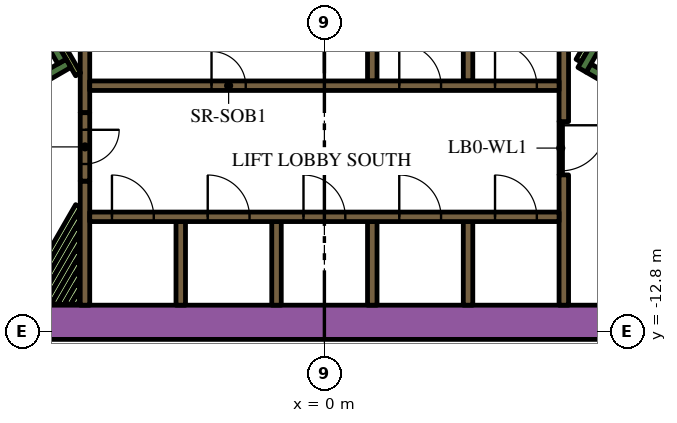
"""IFC4 building model, lengths in metres.
Left out: names, types, materials, properties, quantities, classifications, styles, units other than length and angle.
Written with IfcOpenShell. Run it as: python <this file> out.ifc"""

import sys

from ifc_helpers import new_model, si_unit, direction, frame, frame_2d, origin, place, context, subcontext, project, spatial, rectangle, extrude, element, fill, save


model = new_model("IFC4")
c1 = context("Model", 3, precision=1e-05, world=origin(), true_north=direction((0.0, 1.0)))
c2 = subcontext(c1, "Body", "Model", "MODEL_VIEW")
j1 = project(units=[si_unit("LENGTHUNIT", "METRE"), si_unit("PLANEANGLEUNIT", "RADIAN")], contexts=[c1])
p1 = place(None, origin())
s1 = spatial("IfcSite", under=j1, at=p1, CompositionType="ELEMENT")
p2 = place(p1, origin())
s2 = spatial("IfcBuilding", under=s1, at=p2, CompositionType="ELEMENT")
p3 = place(p2, frame((0.0, 0.0, 74.4)))
s3 = spatial("IfcBuildingStorey", under=s2, at=p3, CompositionType="ELEMENT", Elevation=74.4)
p4 = place(p3, frame((-12.019, -12.55, 0.0), z_axis=(0.0, 0.0, 1.0), x_axis=(1.0, 0.0, 0.0)))
e1 = element("IfcWall", 1, at=p4, inside=s3, PredefinedType="SOLIDWALL", context=c2, shape_type="SweptSolid", body=[
    extrude(rectangle(XDim=21.63, YDim=0.9, at=frame_2d((10.815, 0.0))), origin(), (0.0, 0.0, 1.0), 3.9),
])
p5 = place(p3, frame((12.84, -9.261, 0.0), z_axis=(0.0, 0.0, 1.0), x_axis=(-0.866013990052, 0.500019768644, 0.0)))
e2 = element("IfcWall", 2, at=p5, inside=s3, PredefinedType="SOLIDWALL", context=c2, shape_type="SweptSolid", body=[
    extrude(rectangle(XDim=6.8, YDim=0.25, at=frame_2d((3.4, 0.0))), origin(), (0.0, 0.0, 1.0), 3.9),
])
p6 = place(p3, frame((6.78, -5.906, 0.0), z_axis=(0.0, 0.0, 1.0), x_axis=(0.500223362819, 0.865896406789, 0.0)))
e3 = element("IfcWall", 3, at=p6, inside=s3, PredefinedType="SOLIDWALL", context=c2, shape_type="SweptSolid", body=[
    extrude(rectangle(XDim=0.675, YDim=0.25, at=frame_2d((0.337, 0.0))), origin(), (0.0, 0.0, 1.0), 3.9),
])
p7 = place(p3, frame((-12.84, -9.261, 0.0), z_axis=(0.0, 0.0, 1.0), x_axis=(0.866016039709, 0.500016218704, 0.0)))
e4 = element("IfcWall", 4, at=p7, inside=s3, PredefinedType="SOLIDWALL", context=c2, shape_type="SweptSolid", body=[
    extrude(rectangle(XDim=7.05, YDim=0.25, at=frame_2d((3.525, 0.0))), origin(), (0.0, 0.0, 1.0), 3.9),
])
p8 = place(p3, frame((-6.905, -5.69, 0.0), z_axis=(0.0, 0.0, 1.0), x_axis=(-0.500402024738, 0.865793170242, 0.0)))
e5 = element("IfcWall", 5, at=p8, inside=s3, PredefinedType="SOLIDWALL", context=c2, shape_type="SweptSolid", body=[
    extrude(rectangle(XDim=0.425, YDim=0.25, at=frame_2d((0.212, 0.0))), origin(), (0.0, 0.0, 1.0), 3.9),
])
p9 = place(p3, frame((-3.78, -12.1, 0.0), z_axis=(0.0, 0.0, 1.0), x_axis=(0.0, 1.0, 0.0)))
e6 = element("IfcWall", 6, at=p9, inside=s3, PredefinedType="SOLIDWALL", context=c2, shape_type="SweptSolid", body=[
    extrude(rectangle(XDim=2.2, YDim=0.25, at=frame_2d((1.1, 0.0))), origin(), (0.0, 0.0, 1.0), 3.9),
])
p10 = place(p3, frame((-6.3, -12.1, 0.0), z_axis=(0.0, 0.0, 1.0), x_axis=(0.0, 1.0, 0.0)))
e7 = element("IfcWall", 7, at=p10, inside=s3, PredefinedType="SOLIDWALL", context=c2, shape_type="SweptSolid", body=[
    extrude(rectangle(XDim=3.265, YDim=0.25, at=frame_2d((1.632, 0.0))), origin(), (0.0, 0.0, 1.0), 3.9),
])
for number, where, z_axis, x_axis in (
    (8, (3.78, -4.0, 0.0), (0.0, 0.0, 1.0), (0.0, -1.0, 0.0)),
    (9, (1.26, -4.0, 0.0), (0.0, 0.0, 1.0), (0.0, -1.0, 0.0)),
):
    element("IfcWall", number, at=place(p3, frame(where, z_axis=z_axis, x_axis=x_axis)), inside=s3, PredefinedType="SOLIDWALL", context=c2, shape_type="SweptSolid", body=[
        extrude(rectangle(XDim=2.2, YDim=0.25, at=frame_2d((1.1, 0.0))), origin(), (0.0, 0.0, 1.0), 3.9),
    ])
p11 = place(p3, frame((-6.3, -7.035, 0.0), z_axis=(0.0, 0.0, 1.0), x_axis=(0.0, 1.0, 0.0)))
e10 = element("IfcWall", 10, at=p11, inside=s3, PredefinedType="SOLIDWALL", context=c2, shape_type="SweptSolid", body=[
    extrude(rectangle(XDim=3.285, YDim=0.25, at=frame_2d((1.643, 0.0))), origin(), (0.0, 0.0, 1.0), 3.9),
])
p12 = place(p3, frame((6.3, -7.27, 0.0), z_axis=(0.0, 0.0, 1.0), x_axis=(0.0, 1.0, 0.0)))
e11 = element("IfcWall", 11, at=p12, inside=s3, PredefinedType="SOLIDWALL", context=c2, shape_type="SweptSolid", body=[
    extrude(rectangle(XDim=3.586, YDim=0.25, at=frame_2d((1.793, 0.0))), origin(), (0.0, 0.0, 1.0), 3.9),
])
p13 = place(p3, frame((6.3, -12.1, 0.0), z_axis=(0.0, 0.0, 1.0), x_axis=(0.0, 1.0, 0.0)))
e12 = element("IfcWall", 12, at=p13, inside=s3, PredefinedType="SOLIDWALL", context=c2, shape_type="SweptSolid", body=[
    extrude(rectangle(XDim=3.428, YDim=0.25, at=frame_2d((1.714, 0.0))), origin(), (0.0, 0.0, 1.0), 3.9),
])
for number, where, z_axis, x_axis in (
    (13, (3.78, -12.1, 0.0), (0.0, 0.0, 1.0), (0.0, 1.0, 0.0)),
    (14, (1.26, -12.1, 0.0), (0.0, 0.0, 1.0), (0.0, 1.0, 0.0)),
    (15, (-1.26, -12.1, 0.0), (0.0, 0.0, 1.0), (0.0, 1.0, 0.0)),
):
    element("IfcWall", number, at=place(p3, frame(where, z_axis=z_axis, x_axis=x_axis)), inside=s3, PredefinedType="SOLIDWALL", context=c2, shape_type="SweptSolid", body=[
        extrude(rectangle(XDim=2.2, YDim=0.25, at=frame_2d((1.1, 0.0))), origin(), (0.0, 0.0, 1.0), 3.9),
    ])
p14 = place(p3, frame((-7.968, -12.068, 0.0), z_axis=(0.0, 0.0, 1.0), x_axis=(0.500013701029, 0.866017493347, 0.0)))
e16 = element("IfcWall", 16, at=p14, inside=s3, PredefinedType="PARTITIONING", context=c2, shape_type="SweptSolid", body=[
    extrude(rectangle(XDim=2.975, YDim=0.15, at=frame_2d((1.488, 0.0))), origin(), (0.0, 0.0, 1.0), 2.7),
])
p15 = place(p3, frame((-7.794, -12.068, 0.0), z_axis=(0.0, 0.0, 1.0), x_axis=(0.499985098601, 0.86603400694, 0.0)))
e17 = element("IfcWall", 17, at=p15, inside=s3, PredefinedType="PARTITIONING", context=c2, shape_type="SweptSolid", body=[
    extrude(rectangle(XDim=2.628, YDim=0.15, at=frame_2d((1.314, 0.0))), origin(), (0.0, 0.0, 1.0), 2.7),
])
p16 = place(p3, frame((-7.621, -12.068, 0.0), z_axis=(0.0, 0.0, 1.0), x_axis=(0.500028047758, 0.866009209798, 0.0)))
e18 = element("IfcWall", 18, at=p16, inside=s3, PredefinedType="PARTITIONING", context=c2, shape_type="SweptSolid", body=[
    extrude(rectangle(XDim=2.282, YDim=0.15, at=frame_2d((1.141, 0.0))), origin(), (0.0, 0.0, 1.0), 2.7),
])
p17 = place(p3, frame((-7.448, -12.068, 0.0), z_axis=(0.0, 0.0, 1.0), x_axis=(0.500031751504, 0.866007071269, 0.0)))
e19 = element("IfcWall", 19, at=p17, inside=s3, PredefinedType="PARTITIONING", context=c2, shape_type="SweptSolid", body=[
    extrude(rectangle(XDim=1.936, YDim=0.15, at=frame_2d((0.968, 0.0))), origin(), (0.0, 0.0, 1.0), 2.7),
])
p18 = place(p3, frame((-7.275, -12.068, 0.0), z_axis=(0.0, 0.0, 1.0), x_axis=(0.499988385283, 0.86603210944, 0.0)))
e20 = element("IfcWall", 20, at=p18, inside=s3, PredefinedType="PARTITIONING", context=c2, shape_type="SweptSolid", body=[
    extrude(rectangle(XDim=1.589, YDim=0.15, at=frame_2d((0.795, 0.0))), origin(), (0.0, 0.0, 1.0), 2.7),
])
p19 = place(p3, frame((-7.102, -12.068, 0.0), z_axis=(0.0, 0.0, 1.0), x_axis=(0.500068153333, 0.865986051864, 0.0)))
e21 = element("IfcWall", 21, at=p19, inside=s3, PredefinedType="PARTITIONING", context=c2, shape_type="SweptSolid", body=[
    extrude(rectangle(XDim=1.243, YDim=0.15, at=frame_2d((0.622, 0.0))), origin(), (0.0, 0.0, 1.0), 2.7),
])
p20 = place(p3, frame((-6.928, -12.068, 0.0), z_axis=(0.0, 0.0, 1.0), x_axis=(0.500005339912, 0.866022320763, 0.0)))
e22 = element("IfcWall", 22, at=p20, inside=s3, PredefinedType="PARTITIONING", context=c2, shape_type="SweptSolid", body=[
    extrude(rectangle(XDim=0.896, YDim=0.15, at=frame_2d((0.448, 0.0))), origin(), (0.0, 0.0, 1.0), 2.7),
])
p21 = place(p3, frame((-6.755, -12.068, 0.0), z_axis=(0.0, 0.0, 1.0), x_axis=(0.500196256984, 0.865912065108, 0.0)))
e23 = element("IfcWall", 23, at=p21, inside=s3, PredefinedType="PARTITIONING", context=c2, shape_type="SweptSolid", body=[
    extrude(rectangle(XDim=0.55, YDim=0.15, at=frame_2d((0.275, 0.0))), origin(), (0.0, 0.0, 1.0), 2.7),
])
p22 = place(p3, frame((-6.582, -12.068, 0.0), z_axis=(0.0, 0.0, 1.0), x_axis=(0.499618727529, 0.866245419672, 0.0)))
e24 = element("IfcWall", 24, at=p22, inside=s3, PredefinedType="PARTITIONING", context=c2, shape_type="SweptSolid", body=[
    extrude(rectangle(XDim=0.204, YDim=0.15, at=frame_2d((0.102, 0.0))), origin(), (0.0, 0.0, 1.0), 2.7),
])
p23 = place(p3, frame((-6.48, -6.027, 0.0), z_axis=(0.0, 0.0, 1.0), x_axis=(-0.499927229454, 0.866067413802, 0.0)))
e25 = element("IfcWall", 25, at=p23, inside=s3, PredefinedType="PARTITIONING", context=c2, shape_type="SweptSolid", body=[
    extrude(rectangle(XDim=0.929, YDim=0.15, at=frame_2d((0.464, 0.0))), origin(), (0.0, 0.0, 1.0), 3.9),
])
p24 = place(p3, frame((6.945, -5.222, 0.0), z_axis=(0.0, 0.0, 1.0), x_axis=(-0.499818422106, -0.866130212453, 0.0)))
e26 = element("IfcWall", 26, at=p24, inside=s3, PredefinedType="PARTITIONING", context=c2, shape_type="SweptSolid", body=[
    extrude(rectangle(XDim=0.514, YDim=0.15, at=frame_2d((0.257, 0.0))), origin(), (0.0, 0.0, 1.0), 2.7),
])
p25 = place(p3, frame((-6.175, -9.775, 0.0), z_axis=(0.0, 0.0, 1.0), x_axis=(1.0, 0.0, 0.0)))
e27 = element("IfcWall", 27, at=p25, inside=s3, PredefinedType="SOLIDWALL", context=c2, shape_type="SweptSolid", body=[
    extrude(rectangle(XDim=12.35, YDim=0.25, at=frame_2d((6.175, 0.0))), origin(), (0.0, 0.0, 1.0), 3.9),
])
p26 = place(p25, frame((0.585, 0.0, 0.0)))
e28 = element("IfcOpeningElement", 28, at=p26, cuts=e27, PredefinedType="OPENING", context=c2, shape_type="SweptSolid", body=[
    extrude(rectangle(XDim=1.1, YDim=2.1, at=frame_2d((0.55, 1.05))), frame((0.0, 0.135, 0.0), z_axis=(0.0, -1.0, 0.0), x_axis=(1.0, 0.0, 0.0)), (0.0, 0.0, 1.0), 0.27),
])
p27 = place(p25, frame((3.105, 0.0, 0.0)))
e29 = element("IfcOpeningElement", 29, at=p27, cuts=e27, PredefinedType="OPENING", context=c2, shape_type="SweptSolid", body=[
    extrude(rectangle(XDim=1.1, YDim=2.1, at=frame_2d((0.55, 1.05))), frame((0.0, 0.135, 0.0), z_axis=(0.0, -1.0, 0.0), x_axis=(1.0, 0.0, 0.0)), (0.0, 0.0, 1.0), 0.27),
])
p28 = place(p25, frame((5.625, 0.0, 0.0)))
e30 = element("IfcOpeningElement", 30, at=p28, cuts=e27, PredefinedType="OPENING", context=c2, shape_type="SweptSolid", body=[
    extrude(rectangle(XDim=1.1, YDim=2.1, at=frame_2d((0.55, 1.05))), frame((0.0, 0.135, 0.0), z_axis=(0.0, -1.0, 0.0), x_axis=(1.0, 0.0, 0.0)), (0.0, 0.0, 1.0), 0.27),
])
p29 = place(p25, frame((8.145, 0.0, 0.0)))
e31 = element("IfcOpeningElement", 31, at=p29, cuts=e27, PredefinedType="OPENING", context=c2, shape_type="SweptSolid", body=[
    extrude(rectangle(XDim=1.1, YDim=2.1, at=frame_2d((0.55, 1.05))), frame((0.0, 0.135, 0.0), z_axis=(0.0, -1.0, 0.0), x_axis=(1.0, 0.0, 0.0)), (0.0, 0.0, 1.0), 0.27),
])
p30 = place(p25, frame((10.665, 0.0, 0.0)))
e32 = element("IfcOpeningElement", 32, at=p30, cuts=e27, PredefinedType="OPENING", context=c2, shape_type="SweptSolid", body=[
    extrude(rectangle(XDim=1.1, YDim=2.1, at=frame_2d((0.55, 1.05))), frame((0.0, 0.135, 0.0), z_axis=(0.0, -1.0, 0.0), x_axis=(1.0, 0.0, 0.0)), (0.0, 0.0, 1.0), 0.27),
])
p31 = place(p3, frame((-6.175, -6.325, 0.0), z_axis=(0.0, 0.0, 1.0), x_axis=(1.0, 0.0, 0.0)))
e33 = element("IfcWall", 33, at=p31, inside=s3, PredefinedType="SOLIDWALL", context=c2, shape_type="SweptSolid", body=[
    extrude(rectangle(XDim=12.35, YDim=0.25, at=frame_2d((6.175, 0.0))), origin(), (0.0, 0.0, 1.0), 3.9),
])
p32 = place(p31, frame((3.205, 0.0, 0.0)))
e34 = element("IfcOpeningElement", 34, at=p32, cuts=e33, PredefinedType="OPENING", context=c2, shape_type="SweptSolid", body=[
    extrude(rectangle(XDim=0.9, YDim=2.1, at=frame_2d((0.45, 1.05))), frame((0.0, 0.135, 0.0), z_axis=(0.0, -1.0, 0.0), x_axis=(1.0, 0.0, 0.0)), (0.0, 0.0, 1.0), 0.27),
])
p33 = place(p31, frame((8.145, 0.0, 0.0)))
e35 = element("IfcOpeningElement", 35, at=p33, cuts=e33, PredefinedType="OPENING", context=c2, shape_type="SweptSolid", body=[
    extrude(rectangle(XDim=1.1, YDim=2.1, at=frame_2d((0.55, 1.05))), frame((0.0, 0.135, 0.0), z_axis=(0.0, -1.0, 0.0), x_axis=(1.0, 0.0, 0.0)), (0.0, 0.0, 1.0), 0.27),
])
p34 = place(p31, frame((10.665, 0.0, 0.0)))
e36 = element("IfcOpeningElement", 36, at=p34, cuts=e33, PredefinedType="OPENING", context=c2, shape_type="SweptSolid", body=[
    extrude(rectangle(XDim=1.1, YDim=2.1, at=frame_2d((0.55, 1.05))), frame((0.0, 0.135, 0.0), z_axis=(0.0, -1.0, 0.0), x_axis=(1.0, 0.0, 0.0)), (0.0, 0.0, 1.0), 0.27),
])
p35 = place(p3, frame((-6.3, -7.035, 0.0), z_axis=(0.0, 0.0, 1.0), x_axis=(0.0, -1.0, 0.0)))
e37 = element("IfcWall", 37, at=p35, inside=s3, PredefinedType="SOLIDWALL", context=c2, shape_type="SweptSolid", body=[
    extrude(rectangle(XDim=1.8, YDim=0.25, at=frame_2d((0.9, 0.0))), origin(), (0.0, 0.0, 1.0), 3.9),
])
p36 = place(p35, frame((0.45, 0.0, 0.0)))
e38 = element("IfcOpeningElement", 38, at=p36, cuts=e37, PredefinedType="OPENING", context=c2, shape_type="SweptSolid", body=[
    extrude(rectangle(XDim=0.9, YDim=2.1, at=frame_2d((0.45, 1.05))), frame((0.0, 0.135, 0.0), z_axis=(0.0, -1.0, 0.0), x_axis=(1.0, 0.0, 0.0)), (0.0, 0.0, 1.0), 0.27),
])
p37 = place(p3, frame((6.22, -7.266, 0.0), z_axis=(0.0, 0.0, 1.0), x_axis=(0.0, -1.0, 0.0)))
e39 = element("IfcWall", 39, at=p37, inside=s3, PredefinedType="PARTITIONING", context=c2, shape_type="SweptSolid", body=[
    extrude(rectangle(XDim=1.4, YDim=0.09, at=frame_2d((0.7, 0.0))), origin(), (0.0, 0.0, 1.0), 2.7),
])
p38 = place(p37, frame((0.1, 0.0, 0.0)))
e40 = element("IfcOpeningElement", 40, at=p38, cuts=e39, PredefinedType="OPENING", context=c2, shape_type="SweptSolid", body=[
    extrude(rectangle(XDim=1.2, YDim=2.1, at=frame_2d((0.6, 1.05))), frame((0.0, 0.055, 0.0), z_axis=(0.0, -1.0, 0.0), x_axis=(1.0, 0.0, 0.0)), (0.0, 0.0, 1.0), 0.11),
])
p39 = place(p26, origin())
e41 = element("IfcDoor", 41, at=p39, inside=s3, OperationType="DOUBLE_DOOR_SLIDING", PredefinedType="DOOR", context=c2, shape_type="SweptSolid", body=[
    extrude(rectangle(XDim=1.1, YDim=2.1, at=frame_2d((0.55, 1.05))), frame((0.0, 0.025, 0.0), z_axis=(0.0, -1.0, 0.0), x_axis=(1.0, 0.0, 0.0)), (0.0, 0.0, 1.0), 0.05),
])
fill(e28, e41)
p40 = place(p27, origin())
e42 = element("IfcDoor", 42, at=p40, inside=s3, OperationType="DOUBLE_DOOR_SLIDING", PredefinedType="DOOR", context=c2, shape_type="SweptSolid", body=[
    extrude(rectangle(XDim=1.1, YDim=2.1, at=frame_2d((0.55, 1.05))), frame((0.0, 0.025, 0.0), z_axis=(0.0, -1.0, 0.0), x_axis=(1.0, 0.0, 0.0)), (0.0, 0.0, 1.0), 0.05),
])
fill(e29, e42)
p41 = place(p28, origin())
e43 = element("IfcDoor", 43, at=p41, inside=s3, OperationType="DOUBLE_DOOR_SLIDING", PredefinedType="DOOR", context=c2, shape_type="SweptSolid", body=[
    extrude(rectangle(XDim=1.1, YDim=2.1, at=frame_2d((0.55, 1.05))), frame((0.0, 0.025, 0.0), z_axis=(0.0, -1.0, 0.0), x_axis=(1.0, 0.0, 0.0)), (0.0, 0.0, 1.0), 0.05),
])
fill(e30, e43)
p42 = place(p29, origin())
e44 = element("IfcDoor", 44, at=p42, inside=s3, OperationType="DOUBLE_DOOR_SLIDING", PredefinedType="DOOR", context=c2, shape_type="SweptSolid", body=[
    extrude(rectangle(XDim=1.1, YDim=2.1, at=frame_2d((0.55, 1.05))), frame((0.0, 0.025, 0.0), z_axis=(0.0, -1.0, 0.0), x_axis=(1.0, 0.0, 0.0)), (0.0, 0.0, 1.0), 0.05),
])
fill(e31, e44)
p43 = place(p30, origin())
e45 = element("IfcDoor", 45, at=p43, inside=s3, OperationType="DOUBLE_DOOR_SLIDING", PredefinedType="DOOR", context=c2, shape_type="SweptSolid", body=[
    extrude(rectangle(XDim=1.1, YDim=2.1, at=frame_2d((0.55, 1.05))), frame((0.0, 0.025, 0.0), z_axis=(0.0, -1.0, 0.0), x_axis=(1.0, 0.0, 0.0)), (0.0, 0.0, 1.0), 0.05),
])
fill(e32, e45)
p44 = place(p32, origin())
e46 = element("IfcDoor", 46, at=p44, inside=s3, OperationType="SINGLE_SWING_LEFT", PredefinedType="DOOR", context=c2, shape_type="SweptSolid", body=[
    extrude(rectangle(XDim=0.9, YDim=2.1, at=frame_2d((0.45, 1.05))), frame((0.0, 0.025, 0.0), z_axis=(0.0, -1.0, 0.0), x_axis=(1.0, 0.0, 0.0)), (0.0, 0.0, 1.0), 0.05),
])
fill(e34, e46)
p45 = place(p33, origin())
e47 = element("IfcDoor", 47, at=p45, inside=s3, OperationType="DOUBLE_DOOR_SLIDING", PredefinedType="DOOR", context=c2, shape_type="SweptSolid", body=[
    extrude(rectangle(XDim=1.1, YDim=2.1, at=frame_2d((0.55, 1.05))), frame((0.0, 0.025, 0.0), z_axis=(0.0, -1.0, 0.0), x_axis=(1.0, 0.0, 0.0)), (0.0, 0.0, 1.0), 0.05),
])
fill(e35, e47)
p46 = place(p34, origin())
e48 = element("IfcDoor", 48, at=p46, inside=s3, OperationType="DOUBLE_DOOR_SLIDING", PredefinedType="DOOR", context=c2, shape_type="SweptSolid", body=[
    extrude(rectangle(XDim=1.1, YDim=2.1, at=frame_2d((0.55, 1.05))), frame((0.0, 0.025, 0.0), z_axis=(0.0, -1.0, 0.0), x_axis=(1.0, 0.0, 0.0)), (0.0, 0.0, 1.0), 0.05),
])
fill(e36, e48)
p47 = place(p36, origin())
e49 = element("IfcDoor", 49, at=p47, inside=s3, OperationType="SINGLE_SWING_LEFT", PredefinedType="DOOR", context=c2, shape_type="SweptSolid", body=[
    extrude(rectangle(XDim=0.9, YDim=2.1, at=frame_2d((0.45, 1.05))), frame((0.0, 0.025, 0.0), z_axis=(0.0, -1.0, 0.0), x_axis=(1.0, 0.0, 0.0)), (0.0, 0.0, 1.0), 0.05),
])
fill(e38, e49)
p48 = place(p38, origin())
e50 = element("IfcDoor", 50, at=p48, inside=s3, OperationType="SINGLE_SWING_LEFT", PredefinedType="DOOR", context=c2, shape_type="SweptSolid", body=[
    extrude(rectangle(XDim=1.2, YDim=2.1, at=frame_2d((0.6, 1.05))), frame((0.0, 0.025, 0.0), z_axis=(0.0, -1.0, 0.0), x_axis=(1.0, 0.0, 0.0)), (0.0, 0.0, 1.0), 0.05),
])
fill(e40, e50)
save(model, sys.argv[1])
